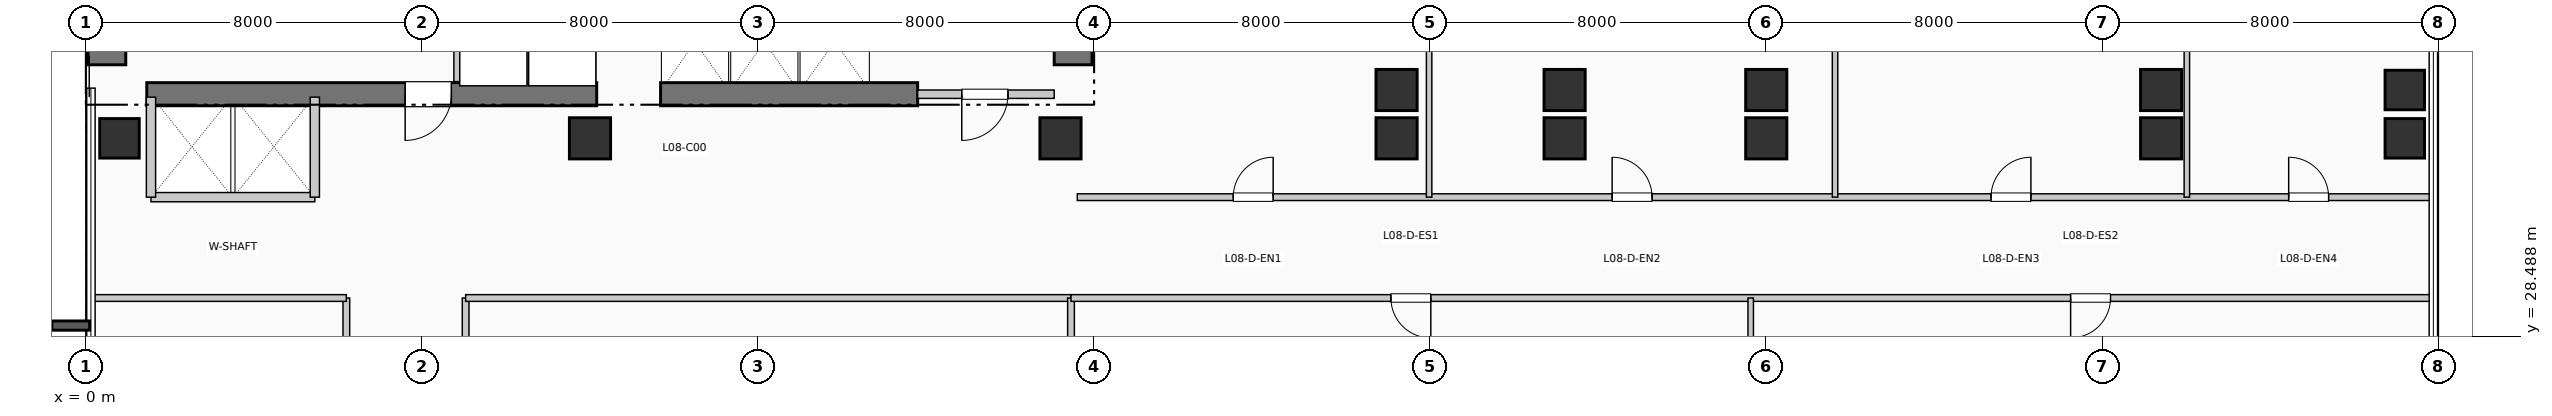
"""IFC4 building model, lengths in metres.
Left out: names, types, materials, properties, quantities, classifications, styles, units other than length and angle.
Written with IfcOpenShell. Run it as: python <this file> out.ifc"""

import sys

from ifc_helpers import new_model, si_unit, direction, frame, frame_2d, origin, origin_2d, place, context, subcontext, project, spatial, rectangle, extrude, element, fill, save


model = new_model("IFC4")
c1 = context("Model", 3, precision=1e-05, world=origin(), true_north=direction((0.0, 1.0)))
c2 = subcontext(c1, "Body", "Model", "MODEL_VIEW")
j1 = project(units=[si_unit("LENGTHUNIT", "METRE"), si_unit("PLANEANGLEUNIT", "RADIAN")], contexts=[c1])
p1 = place(None, origin())
s1 = spatial("IfcSite", under=j1, at=p1, CompositionType="ELEMENT")
p2 = place(p1, origin())
s2 = spatial("IfcBuilding", under=s1, at=p2, CompositionType="ELEMENT")
p3 = place(p2, frame((0.0, 0.0, 38.28)))
s3 = spatial("IfcBuildingStorey", under=s2, at=p3, CompositionType="ELEMENT", Elevation=38.28)
p4 = place(p3, frame((0.5, 34.95, 0.0), z_axis=(0.0, 0.0, 1.0), x_axis=(0.0, 1.0, 0.0)))
e1 = element("IfcWall", 1, at=p4, inside=s3, PredefinedType="SHEAR", context=c2, shape_type="SweptSolid", body=[
    extrude(rectangle(XDim=7.9, YDim=0.9, at=frame_2d((3.95, 0.0))), origin(), (0.0, 0.0, 1.0), 3.96),
])
p5 = place(p3, frame((23.5, 34.95, 0.0), z_axis=(0.0, 0.0, 1.0), x_axis=(0.0, 1.0, 0.0)))
e2 = element("IfcWall", 2, at=p5, inside=s3, PredefinedType="SHEAR", context=c2, shape_type="SweptSolid", body=[
    extrude(rectangle(XDim=10.64, YDim=0.9, at=frame_2d((5.32, 0.0))), origin(), (0.0, 0.0, 1.0), 3.96),
])
p6 = place(p3, frame((1.45, 34.25, 0.0), z_axis=(0.0, 0.0, 1.0), x_axis=(1.0, 0.0, 0.0)))
e3 = element("IfcWall", 3, at=p6, inside=s3, PredefinedType="SHEAR", context=c2, shape_type="SweptSolid", body=[
    extrude(rectangle(XDim=10.71, YDim=0.55, at=frame_2d((5.355, 0.0))), origin(), (0.0, 0.0, 1.0), 3.96),
])
p7 = place(p6, frame((7.25, 0.0, 0.0), z_axis=(0.0, 0.0, 1.0), x_axis=(-1.0, 0.0, 0.0)))
e4 = element("IfcOpeningElement", 4, at=p7, cuts=e3, PredefinedType="OPENING", context=c2, shape_type="SweptSolid", body=[
    extrude(rectangle(XDim=1.1, YDim=2.15, at=frame_2d((0.55, 1.075))), frame((0.0, 0.285, 0.0), z_axis=(0.0, -1.0, 0.0), x_axis=(1.0, 0.0, 0.0)), (0.0, 0.0, 1.0), 0.57),
])
p8 = place(p3, frame((13.68, 34.25, 0.0), z_axis=(0.0, 0.0, 1.0), x_axis=(1.0, 0.0, 0.0)))
e5 = element("IfcWall", 5, at=p8, inside=s3, PredefinedType="SHEAR", context=c2, shape_type="SweptSolid", body=[
    extrude(rectangle(XDim=6.12, YDim=0.55, at=frame_2d((3.06, 0.0))), origin(), (0.0, 0.0, 1.0), 3.96),
])
p9 = place(p3, frame((0.8, 33.2, 0.0), z_axis=(0.0, 0.0, 1.0), x_axis=(1.0, 0.0, 0.0)))
e6 = element("IfcColumn", 6, at=p9, inside=s3, PredefinedType="COLUMN", context=c2, shape_type="SweptSolid", body=[
    extrude(rectangle(XDim=0.94, YDim=0.94, at=origin_2d()), origin(), (0.0, 0.0, 1.0), 3.96),
])
for number, where, z_axis, x_axis in (
    (7, (12.0, 33.2, 0.0), (0.0, 0.0, 1.0), (1.0, 0.0, 0.0)),
    (8, (23.2, 33.2, 0.0), (0.0, 0.0, 1.0), (1.0, 0.0, 0.0)),
    (9, (31.2, 33.2, 0.0), (0.0, 0.0, 1.0), (1.0, 0.0, 0.0)),
    (10, (31.2, 34.35, 0.0), (0.0, 0.0, 1.0), (1.0, 0.0, 0.0)),
    (11, (35.2, 33.2, 0.0), (0.0, 0.0, 1.0), (1.0, 0.0, 0.0)),
    (12, (35.2, 34.35, 0.0), (0.0, 0.0, 1.0), (1.0, 0.0, 0.0)),
    (13, (40.0, 33.2, 0.0), (0.0, 0.0, 1.0), (1.0, 0.0, 0.0)),
    (14, (40.0, 34.35, 0.0), (0.0, 0.0, 1.0), (1.0, 0.0, 0.0)),
    (15, (49.4, 33.2, 0.0), (0.0, 0.0, 1.0), (1.0, 0.0, 0.0)),
    (16, (49.4, 34.35, 0.0), (0.0, 0.0, 1.0), (1.0, 0.0, 0.0)),
):
    element("IfcColumn", number, at=place(p3, frame(where, z_axis=z_axis, x_axis=x_axis)), inside=s3, PredefinedType="COLUMN", context=c2, shape_type="SweptSolid", body=[
        extrude(rectangle(XDim=0.98, YDim=0.98, at=origin_2d()), origin(), (0.0, 0.0, 1.0), 3.96),
    ])
for number, where, z_axis, x_axis in (
    (17, (55.2, 33.2, 0.0), (0.0, 0.0, 1.0), (1.0, 0.0, 0.0)),
    (18, (55.2, 34.35, 0.0), (0.0, 0.0, 1.0), (1.0, 0.0, 0.0)),
):
    element("IfcColumn", number, at=place(p3, frame(where, z_axis=z_axis, x_axis=x_axis)), inside=s3, PredefinedType="COLUMN", context=c2, shape_type="SweptSolid", body=[
        extrude(rectangle(XDim=0.94, YDim=0.94, at=origin_2d()), origin(), (0.0, 0.0, 1.0), 3.96),
    ])
p10 = place(p3, frame((8.86, 34.55, 0.0), z_axis=(0.0, 0.0, 1.0), x_axis=(0.0, 1.0, 0.0)))
e19 = element("IfcWall", 19, at=p10, inside=s3, PredefinedType="PARTITIONING", context=c2, shape_type="SweptSolid", body=[
    extrude(rectangle(XDim=2.5, YDim=0.2, at=frame_2d((1.25, 0.0))), origin(), (0.0, 0.0, 1.0), 3.71),
])
p11 = place(p3, frame((19.8, 34.25, 0.0), z_axis=(0.0, 0.0, 1.0), x_axis=(1.0, 0.0, 0.0)))
e20 = element("IfcWall", 20, at=p11, inside=s3, PredefinedType="PARTITIONING", context=c2, shape_type="SweptSolid", body=[
    extrude(rectangle(XDim=3.25, YDim=0.2, at=frame_2d((1.625, 0.0))), origin(), (0.0, 0.0, 1.0), 3.71),
])
p12 = place(p11, frame((2.15, 0.0, 0.0), z_axis=(0.0, 0.0, 1.0), x_axis=(-1.0, 0.0, 0.0)))
e21 = element("IfcOpeningElement", 21, at=p12, cuts=e20, PredefinedType="OPENING", context=c2, shape_type="SweptSolid", body=[
    extrude(rectangle(XDim=1.1, YDim=2.15, at=frame_2d((0.55, 1.075))), frame((0.0, 0.11, 0.0), z_axis=(0.0, -1.0, 0.0), x_axis=(1.0, 0.0, 0.0)), (0.0, 0.0, 1.0), 0.22),
])
p13 = place(p3, frame((1.55, 31.8, 0.0), z_axis=(0.0, 0.0, 1.0), x_axis=(1.0, 0.0, 0.0)))
e22 = element("IfcWall", 22, at=p13, inside=s3, PredefinedType="PARTITIONING", context=c2, shape_type="SweptSolid", body=[
    extrude(rectangle(XDim=3.9, YDim=0.22, at=frame_2d((1.95, 0.0))), origin(), (0.0, 0.0, 1.0), 3.71),
])
for number, where, z_axis, x_axis in (
    (23, (1.55, 31.8, 0.0), (0.0, 0.0, 1.0), (0.0, 1.0, 0.0)),
    (24, (5.45, 31.8, 0.0), (0.0, 0.0, 1.0), (0.0, 1.0, 0.0)),
):
    element("IfcWall", number, at=place(p3, frame(where, z_axis=z_axis, x_axis=x_axis)), inside=s3, PredefinedType="PARTITIONING", context=c2, shape_type="SweptSolid", body=[
        extrude(rectangle(XDim=2.38, YDim=0.22, at=frame_2d((1.19, 0.0))), origin(), (0.0, 0.0, 1.0), 3.71),
    ])
p14 = place(p3, frame((6.2, 5.8, 0.0), z_axis=(0.0, 0.0, 1.0), x_axis=(0.0, 1.0, 0.0)))
e25 = element("IfcWall", 25, at=p14, inside=s3, PredefinedType="PARTITIONING", context=c2, shape_type="SweptSolid", body=[
    extrude(rectangle(XDim=23.6, YDim=0.16, at=frame_2d((11.8, 0.0))), origin(), (0.0, 0.0, 1.0), 3.71),
])
p15 = place(p14, frame((4.487, 0.0, 0.0), z_axis=(0.0, 0.0, 1.0), x_axis=(-1.0, 0.0, 0.0)))
e26 = element("IfcOpeningElement", 26, at=p15, cuts=e25, PredefinedType="OPENING", context=c2, shape_type="SweptSolid", body=[
    extrude(rectangle(XDim=0.95, YDim=2.15, at=frame_2d((0.475, 1.075))), frame((0.0, 0.09, 0.0), z_axis=(0.0, -1.0, 0.0), x_axis=(1.0, 0.0, 0.0)), (0.0, 0.0, 1.0), 0.18),
])
p16 = place(p14, frame((12.511, 0.0, 0.0), z_axis=(0.0, 0.0, 1.0), x_axis=(-1.0, 0.0, 0.0)))
e27 = element("IfcOpeningElement", 27, at=p16, cuts=e25, PredefinedType="OPENING", context=c2, shape_type="SweptSolid", body=[
    extrude(rectangle(XDim=0.95, YDim=2.15, at=frame_2d((0.475, 1.075))), frame((0.0, 0.09, 0.0), z_axis=(0.0, -1.0, 0.0), x_axis=(1.0, 0.0, 0.0)), (0.0, 0.0, 1.0), 0.18),
])
p17 = place(p14, frame((20.299, 0.0, 0.0), z_axis=(0.0, 0.0, 1.0), x_axis=(-1.0, 0.0, 0.0)))
e28 = element("IfcOpeningElement", 28, at=p17, cuts=e25, PredefinedType="OPENING", context=c2, shape_type="SweptSolid", body=[
    extrude(rectangle(XDim=0.95, YDim=2.15, at=frame_2d((0.475, 1.075))), frame((0.0, 0.09, 0.0), z_axis=(0.0, -1.0, 0.0), x_axis=(1.0, 0.0, 0.0)), (0.0, 0.0, 1.0), 0.18),
])
p18 = place(p3, frame((9.04, 5.8, 0.0), z_axis=(0.0, 0.0, 1.0), x_axis=(0.0, 1.0, 0.0)))
e29 = element("IfcWall", 29, at=p18, inside=s3, PredefinedType="PARTITIONING", context=c2, shape_type="SweptSolid", body=[
    extrude(rectangle(XDim=23.6, YDim=0.16, at=frame_2d((11.8, 0.0))), origin(), (0.0, 0.0, 1.0), 3.71),
])
p19 = place(p18, frame((4.953, 0.0, 0.0)))
e30 = element("IfcOpeningElement", 30, at=p19, cuts=e29, PredefinedType="OPENING", context=c2, shape_type="SweptSolid", body=[
    extrude(rectangle(XDim=0.95, YDim=2.15, at=frame_2d((0.475, 1.075))), frame((0.0, 0.09, 0.0), z_axis=(0.0, -1.0, 0.0), x_axis=(1.0, 0.0, 0.0)), (0.0, 0.0, 1.0), 0.18),
])
p20 = place(p18, frame((16.753, 0.0, 0.0)))
e31 = element("IfcOpeningElement", 31, at=p20, cuts=e29, PredefinedType="OPENING", context=c2, shape_type="SweptSolid", body=[
    extrude(rectangle(XDim=0.95, YDim=2.15, at=frame_2d((0.475, 1.075))), frame((0.0, 0.09, 0.0), z_axis=(0.0, -1.0, 0.0), x_axis=(1.0, 0.0, 0.0)), (0.0, 0.0, 1.0), 0.18),
])
p21 = place(p3, frame((0.19, 29.4, 0.0), z_axis=(0.0, 0.0, 1.0), x_axis=(1.0, 0.0, 0.0)))
e32 = element("IfcWall", 32, at=p21, inside=s3, PredefinedType="PARTITIONING", context=c2, shape_type="SweptSolid", body=[
    extrude(rectangle(XDim=6.01, YDim=0.16, at=frame_2d((3.005, 0.0))), origin(), (0.0, 0.0, 1.0), 3.365),
])
p22 = place(p3, frame((9.04, 29.4, 0.0), z_axis=(0.0, 0.0, 1.0), x_axis=(1.0, 0.0, 0.0)))
e33 = element("IfcWall", 33, at=p22, inside=s3, PredefinedType="PARTITIONING", context=c2, shape_type="SweptSolid", body=[
    extrude(rectangle(XDim=14.41, YDim=0.16, at=frame_2d((7.205, 0.0))), origin(), (0.0, 0.0, 1.0), 3.365),
])
p23 = place(p3, frame((23.45, 1.04, 0.0), z_axis=(0.0, 0.0, 1.0), x_axis=(0.0, 1.0, 0.0)))
e34 = element("IfcWall", 34, at=p23, inside=s3, PredefinedType="PARTITIONING", context=c2, shape_type="SweptSolid", body=[
    extrude(rectangle(XDim=28.36, YDim=0.16, at=frame_2d((14.18, 0.0))), origin(), (0.0, 0.0, 1.0), 2.995),
])
p24 = place(p3, frame((23.45, 29.4, 0.0), z_axis=(0.0, 0.0, 1.0), x_axis=(1.0, 0.0, 0.0)))
e35 = element("IfcWall", 35, at=p24, inside=s3, PredefinedType="PARTITIONING", context=c2, shape_type="SweptSolid", body=[
    extrude(rectangle(XDim=32.36, YDim=0.16, at=frame_2d((16.18, 0.0))), origin(), (0.0, 0.0, 1.0), 3.365),
])
p25 = place(p24, frame((8.565, 0.0, 0.0), z_axis=(0.0, 0.0, 1.0), x_axis=(-1.0, 0.0, 0.0)))
e36 = element("IfcOpeningElement", 36, at=p25, cuts=e35, PredefinedType="OPENING", context=c2, shape_type="SweptSolid", body=[
    extrude(rectangle(XDim=0.95, YDim=2.15, at=frame_2d((0.475, 1.075))), frame((0.0, 0.09, 0.0), z_axis=(0.0, -1.0, 0.0), x_axis=(1.0, 0.0, 0.0)), (0.0, 0.0, 1.0), 0.18),
])
p26 = place(p24, frame((24.745, 0.0, 0.0), z_axis=(0.0, 0.0, 1.0), x_axis=(-1.0, 0.0, 0.0)))
e37 = element("IfcOpeningElement", 37, at=p26, cuts=e35, PredefinedType="OPENING", context=c2, shape_type="SweptSolid", body=[
    extrude(rectangle(XDim=0.95, YDim=2.15, at=frame_2d((0.475, 1.075))), frame((0.0, 0.09, 0.0), z_axis=(0.0, -1.0, 0.0), x_axis=(1.0, 0.0, 0.0)), (0.0, 0.0, 1.0), 0.18),
])
p27 = place(p3, frame((23.6, 31.8, 0.0), z_axis=(0.0, 0.0, 1.0), x_axis=(1.0, 0.0, 0.0)))
e38 = element("IfcWall", 38, at=p27, inside=s3, PredefinedType="PARTITIONING", context=c2, shape_type="SweptSolid", body=[
    extrude(rectangle(XDim=32.21, YDim=0.16, at=frame_2d((16.105, 0.0))), origin(), (0.0, 0.0, 1.0), 3.71),
])
p28 = place(p27, frame((3.712, 0.0, 0.0)))
e39 = element("IfcOpeningElement", 39, at=p28, cuts=e38, PredefinedType="OPENING", context=c2, shape_type="SweptSolid", body=[
    extrude(rectangle(XDim=0.95, YDim=2.15, at=frame_2d((0.475, 1.075))), frame((0.0, 0.09, 0.0), z_axis=(0.0, -1.0, 0.0), x_axis=(1.0, 0.0, 0.0)), (0.0, 0.0, 1.0), 0.18),
])
p29 = place(p27, frame((12.731, 0.0, 0.0)))
e40 = element("IfcOpeningElement", 40, at=p29, cuts=e38, PredefinedType="OPENING", context=c2, shape_type="SweptSolid", body=[
    extrude(rectangle(XDim=0.95, YDim=2.15, at=frame_2d((0.475, 1.075))), frame((0.0, 0.09, 0.0), z_axis=(0.0, -1.0, 0.0), x_axis=(1.0, 0.0, 0.0)), (0.0, 0.0, 1.0), 0.18),
])
p30 = place(p27, frame((21.75, 0.0, 0.0)))
e41 = element("IfcOpeningElement", 41, at=p30, cuts=e38, PredefinedType="OPENING", context=c2, shape_type="SweptSolid", body=[
    extrude(rectangle(XDim=0.95, YDim=2.15, at=frame_2d((0.475, 1.075))), frame((0.0, 0.09, 0.0), z_axis=(0.0, -1.0, 0.0), x_axis=(1.0, 0.0, 0.0)), (0.0, 0.0, 1.0), 0.18),
])
p31 = place(p27, frame((28.836, 0.0, 0.0)))
e42 = element("IfcOpeningElement", 42, at=p31, cuts=e38, PredefinedType="OPENING", context=c2, shape_type="SweptSolid", body=[
    extrude(rectangle(XDim=0.95, YDim=2.15, at=frame_2d((0.475, 1.075))), frame((0.0, 0.09, 0.0), z_axis=(0.0, -1.0, 0.0), x_axis=(1.0, 0.0, 0.0)), (0.0, 0.0, 1.0), 0.18),
])
p32 = place(p3, frame((39.63, 18.19, 0.0), z_axis=(0.0, 0.0, 1.0), x_axis=(0.0, 1.0, 0.0)))
e43 = element("IfcWall", 43, at=p32, inside=s3, PredefinedType="PARTITIONING", context=c2, shape_type="SweptSolid", body=[
    extrude(rectangle(XDim=11.21, YDim=0.13, at=frame_2d((5.605, 0.0))), origin(), (0.0, 0.0, 1.0), 2.995),
])
for number, where, z_axis, x_axis in (
    (44, (31.975, 31.8, 0.0), (0.0, 0.0, 1.0), (0.0, 1.0, 0.0)),
    (45, (41.638, 31.8, 0.0), (0.0, 0.0, 1.0), (0.0, 1.0, 0.0)),
    (46, (50.012, 31.8, 0.0), (0.0, 0.0, 1.0), (0.0, 1.0, 0.0)),
):
    element("IfcWall", number, at=place(p3, frame(where, z_axis=z_axis, x_axis=x_axis)), inside=s3, PredefinedType="PARTITIONING", context=c2, shape_type="SweptSolid", body=[
        extrude(rectangle(XDim=14.01, YDim=0.13, at=frame_2d((7.005, 0.0))), origin(), (0.0, 0.0, 1.0), 3.71),
    ])
p33 = place(p7, origin())
e47 = element("IfcDoor", 47, at=p33, inside=s3, OperationType="SINGLE_SWING_LEFT", PredefinedType="DOOR", context=c2, shape_type="SweptSolid", body=[
    extrude(rectangle(XDim=1.1, YDim=2.15, at=frame_2d((0.55, 1.075))), frame((0.0, 0.025, 0.0), z_axis=(0.0, -1.0, 0.0), x_axis=(1.0, 0.0, 0.0)), (0.0, 0.0, 1.0), 0.05),
])
fill(e4, e47)
p34 = place(p12, origin())
e48 = element("IfcDoor", 48, at=p34, inside=s3, OperationType="SINGLE_SWING_LEFT", PredefinedType="DOOR", context=c2, shape_type="SweptSolid", body=[
    extrude(rectangle(XDim=1.1, YDim=2.15, at=frame_2d((0.55, 1.075))), frame((0.0, 0.025, 0.0), z_axis=(0.0, -1.0, 0.0), x_axis=(1.0, 0.0, 0.0)), (0.0, 0.0, 1.0), 0.05),
])
fill(e21, e48)
p35 = place(p25, origin())
e49 = element("IfcDoor", 49, at=p35, inside=s3, OperationType="SINGLE_SWING_RIGHT", PredefinedType="DOOR", context=c2, shape_type="SweptSolid", body=[
    extrude(rectangle(XDim=0.95, YDim=2.15, at=frame_2d((0.475, 1.075))), frame((0.0, 0.025, 0.0), z_axis=(0.0, -1.0, 0.0), x_axis=(1.0, 0.0, 0.0)), (0.0, 0.0, 1.0), 0.05),
])
fill(e36, e49)
p36 = place(p26, origin())
e50 = element("IfcDoor", 50, at=p36, inside=s3, OperationType="SINGLE_SWING_LEFT", PredefinedType="DOOR", context=c2, shape_type="SweptSolid", body=[
    extrude(rectangle(XDim=0.95, YDim=2.15, at=frame_2d((0.475, 1.075))), frame((0.0, 0.025, 0.0), z_axis=(0.0, -1.0, 0.0), x_axis=(1.0, 0.0, 0.0)), (0.0, 0.0, 1.0), 0.05),
])
fill(e37, e50)
p37 = place(p28, origin())
e51 = element("IfcDoor", 51, at=p37, inside=s3, OperationType="SINGLE_SWING_RIGHT", PredefinedType="DOOR", context=c2, shape_type="SweptSolid", body=[
    extrude(rectangle(XDim=0.95, YDim=2.15, at=frame_2d((0.475, 1.075))), frame((0.0, 0.025, 0.0), z_axis=(0.0, -1.0, 0.0), x_axis=(1.0, 0.0, 0.0)), (0.0, 0.0, 1.0), 0.05),
])
fill(e39, e51)
p38 = place(p29, origin())
e52 = element("IfcDoor", 52, at=p38, inside=s3, OperationType="SINGLE_SWING_LEFT", PredefinedType="DOOR", context=c2, shape_type="SweptSolid", body=[
    extrude(rectangle(XDim=0.95, YDim=2.15, at=frame_2d((0.475, 1.075))), frame((0.0, 0.025, 0.0), z_axis=(0.0, -1.0, 0.0), x_axis=(1.0, 0.0, 0.0)), (0.0, 0.0, 1.0), 0.05),
])
fill(e40, e52)
p39 = place(p30, origin())
e53 = element("IfcDoor", 53, at=p39, inside=s3, OperationType="SINGLE_SWING_RIGHT", PredefinedType="DOOR", context=c2, shape_type="SweptSolid", body=[
    extrude(rectangle(XDim=0.95, YDim=2.15, at=frame_2d((0.475, 1.075))), frame((0.0, 0.025, 0.0), z_axis=(0.0, -1.0, 0.0), x_axis=(1.0, 0.0, 0.0)), (0.0, 0.0, 1.0), 0.05),
])
fill(e41, e53)
p40 = place(p31, origin())
e54 = element("IfcDoor", 54, at=p40, inside=s3, OperationType="SINGLE_SWING_LEFT", PredefinedType="DOOR", context=c2, shape_type="SweptSolid", body=[
    extrude(rectangle(XDim=0.95, YDim=2.15, at=frame_2d((0.475, 1.075))), frame((0.0, 0.025, 0.0), z_axis=(0.0, -1.0, 0.0), x_axis=(1.0, 0.0, 0.0)), (0.0, 0.0, 1.0), 0.05),
])
fill(e42, e54)
save(model, sys.argv[1])
